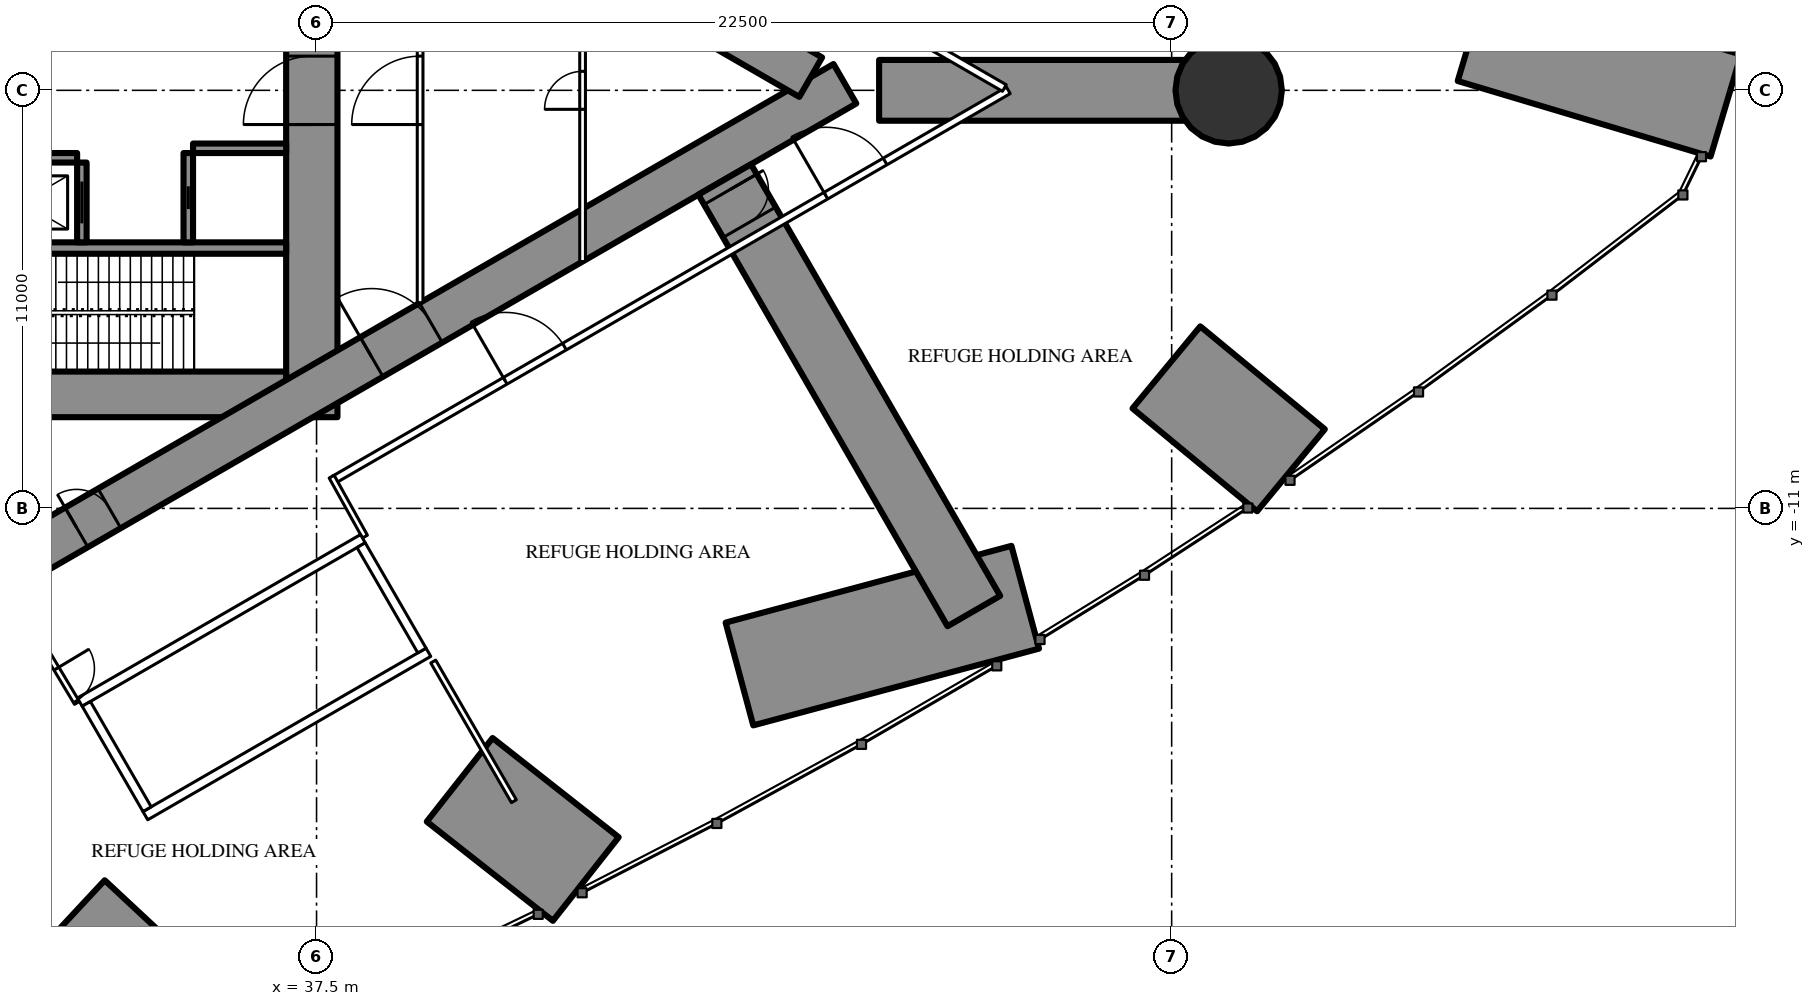
"""IFC4 building model, lengths in metres.
Left out: names, types, materials, properties, quantities, classifications, styles, units other than length and angle.
Written with IfcOpenShell. Run it as: python <this file> out.ifc"""

import sys

from ifc_helpers import new_model, si_unit, direction, frame, frame_2d, origin, origin_2d, place, context, subcontext, project, spatial, rectangle, hollow_circle, extrude, element, fill, save


model = new_model("IFC4")
c1 = context("Model", 3, precision=1e-05, world=origin(), true_north=direction((0.0, 1.0)))
c2 = subcontext(c1, "Body", "Model", "MODEL_VIEW")
j1 = project(units=[si_unit("LENGTHUNIT", "METRE"), si_unit("PLANEANGLEUNIT", "RADIAN")], contexts=[c1])
p1 = place(None, origin())
s1 = spatial("IfcSite", under=j1, at=p1, CompositionType="ELEMENT")
p2 = place(p1, origin())
s2 = spatial("IfcBuilding", under=s1, at=p2, CompositionType="ELEMENT")
p3 = place(p2, frame((0.0, 0.0, 81.0)))
s3 = spatial("IfcBuildingStorey", under=s2, at=p3, CompositionType="ELEMENT", Elevation=81.0)
p4 = place(p3, frame((74.581, -0.401, 0.0), z_axis=(0.0, 0.0, 1.0), x_axis=(-0.958128639998, 0.286338102974, 0.0)))
e1 = element("IfcWall", 1, at=p4, inside=s3, PredefinedType="SHEAR", context=c2, shape_type="SweptSolid", body=[
    extrude(rectangle(XDim=6.944, YDim=2.8, at=frame_2d((3.472, 0.0))), origin(), (0.0, 0.0, 1.0), 6.0),
])
p5 = place(p3, frame((28.957, -26.027, 0.0), z_axis=(0.0, 0.0, 1.0), x_axis=(0.681428532725, 0.731884659484, 0.0)))
e2 = element("IfcWall", 2, at=p5, inside=s3, PredefinedType="SHEAR", context=c2, shape_type="SweptSolid", body=[
    extrude(rectangle(XDim=5.86, YDim=2.8, at=frame_2d((2.93, 0.0))), origin(), (0.0, 0.0, 1.0), 6.0),
])
p6 = place(p3, frame((44.584, -20.752, 0.0), z_axis=(0.0, 0.0, 1.0), x_axis=(-0.785936955348, 0.618306640931, 0.0)))
e3 = element("IfcWall", 3, at=p6, inside=s3, PredefinedType="SHEAR", context=c2, shape_type="SweptSolid", body=[
    extrude(rectangle(XDim=4.222, YDim=2.8, at=frame_2d((2.111, 0.0))), origin(), (0.0, 0.0, 1.0), 6.0),
])
p7 = place(p3, frame((56.147, -13.337, 0.0), z_axis=(0.0, 0.0, 1.0), x_axis=(-0.965766047912, -0.259414611578, 0.0)))
e4 = element("IfcWall", 4, at=p7, inside=s3, PredefinedType="SHEAR", context=c2, shape_type="SweptSolid", body=[
    extrude(rectangle(XDim=7.787, YDim=2.8, at=frame_2d((3.894, 0.0))), origin(), (0.0, 0.0, 1.0), 6.0),
])
p8 = place(p3, frame((63.139, -9.996, 0.0), z_axis=(0.0, 0.0, 1.0), x_axis=(-0.771080676244, 0.636737458238, 0.0)))
e5 = element("IfcWall", 5, at=p8, inside=s3, PredefinedType="SHEAR", context=c2, shape_type="SweptSolid", body=[
    extrude(rectangle(XDim=4.251, YDim=2.8, at=frame_2d((2.125, 0.0))), origin(), (0.0, 0.0, 1.0), 6.0),
])
p9 = place(p3, frame((61.5, 0.0, 0.0), z_axis=(0.0, 0.0, 1.0), x_axis=(1.0, 0.0, 0.0)))
e6 = element("IfcColumn", 6, at=p9, inside=s3, PredefinedType="COLUMN", context=c2, shape_type="SweptSolid", body=[
    extrude(hollow_circle(Radius=1.4, WallThickness=0.1, at=origin_2d()), origin(), (0.0, 0.0, 1.0), 6.0),
])
p10 = place(p3, frame((37.375, -8.6, 0.0), z_axis=(0.0, 0.0, 1.0), x_axis=(0.0, 1.0, 0.0)))
e7 = element("IfcWall", 7, at=p10, inside=s3, PredefinedType="SHEAR", context=c2, shape_type="SweptSolid", body=[
    extrude(rectangle(XDim=17.2, YDim=1.35, at=frame_2d((8.6, 0.0))), origin(), (0.0, 0.0, 1.0), 6.0),
])
p11 = place(p10, frame((7.7, 0.0, 0.0)))
e8 = element("IfcOpeningElement", 8, at=p11, cuts=e7, PredefinedType="OPENING", context=c2, shape_type="SweptSolid", body=[
    extrude(rectangle(XDim=1.8, YDim=2.2, at=frame_2d((0.9, 1.1))), frame((0.0, 0.685, 0.0), z_axis=(0.0, -1.0, 0.0), x_axis=(1.0, 0.0, 0.0)), (0.0, 0.0, 1.0), 1.37),
])
p12 = place(p3, frame((28.3, -8.0, 0.0), z_axis=(0.0, 0.0, 1.0), x_axis=(1.0, 0.0, 0.0)))
e9 = element("IfcWall", 9, at=p12, inside=s3, PredefinedType="SHEAR", context=c2, shape_type="SweptSolid", body=[
    extrude(rectangle(XDim=8.4, YDim=1.2, at=frame_2d((4.2, 0.0))), origin(), (0.0, 0.0, 1.0), 6.0),
])
p13 = place(p12, frame((0.25, 0.0, 0.0)))
e10 = element("IfcOpeningElement", 10, at=p13, cuts=e9, PredefinedType="OPENING", context=c2, shape_type="SweptSolid", body=[
    extrude(rectangle(XDim=1.0, YDim=2.2, at=frame_2d((0.5, 1.1))), frame((0.0, 0.61, 0.0), z_axis=(0.0, -1.0, 0.0), x_axis=(1.0, 0.0, 0.0)), (0.0, 0.0, 1.0), 1.22),
])
p14 = place(p3, frame((28.3, -4.15, 0.0), z_axis=(0.0, 0.0, 1.0), x_axis=(1.0, 0.0, 0.0)))
e11 = element("IfcWall", 11, at=p14, inside=s3, PredefinedType="SHEAR", context=c2, shape_type="SweptSolid", body=[
    extrude(rectangle(XDim=8.4, YDim=0.3, at=frame_2d((4.2, 0.0))), origin(), (0.0, 0.0, 1.0), 6.0),
])
p15 = place(p3, frame((31.325, -4.0, 0.0), z_axis=(0.0, 0.0, 1.0), x_axis=(0.0, 1.0, 0.0)))
e12 = element("IfcWall", 12, at=p15, inside=s3, PredefinedType="SHEAR", context=c2, shape_type="SweptSolid", body=[
    extrude(rectangle(XDim=2.1, YDim=0.25, at=frame_2d((1.05, 0.0))), origin(), (0.0, 0.0, 1.0), 6.0),
])
p16 = place(p15, frame((0.5, 0.0, 0.0)))
e13 = element("IfcOpeningElement", 13, at=p16, cuts=e12, PredefinedType="OPENING", context=c2, shape_type="SweptSolid", body=[
    extrude(rectangle(XDim=1.1, YDim=2.2, at=frame_2d((0.55, 1.1))), frame((0.0, 0.135, 0.0), z_axis=(0.0, -1.0, 0.0), x_axis=(1.0, 0.0, 0.0)), (0.0, 0.0, 1.0), 0.27),
])
p17 = place(p3, frame((34.125, -4.0, 0.0), z_axis=(0.0, 0.0, 1.0), x_axis=(0.0, 1.0, 0.0)))
e14 = element("IfcWall", 14, at=p17, inside=s3, PredefinedType="SHEAR", context=c2, shape_type="SweptSolid", body=[
    extrude(rectangle(XDim=2.35, YDim=0.25, at=frame_2d((1.175, 0.0))), origin(), (0.0, 0.0, 1.0), 6.0),
])
p18 = place(p17, frame((0.875, 0.0, 0.0)))
e15 = element("IfcOpeningElement", 15, at=p18, cuts=e14, PredefinedType="OPENING", context=c2, shape_type="SweptSolid", body=[
    extrude(rectangle(XDim=0.6, YDim=2.0, at=frame_2d((0.3, 1.0))), frame((0.0, 0.135, 0.0), z_axis=(0.0, -1.0, 0.0), x_axis=(1.0, 0.0, 0.0)), (0.0, 0.0, 1.0), 0.27),
])
p19 = place(p3, frame((28.3, -1.775, 0.0), z_axis=(0.0, 0.0, 1.0), x_axis=(1.0, 0.0, 0.0)))
e16 = element("IfcWall", 16, at=p19, inside=s3, PredefinedType="SHEAR", context=c2, shape_type="SweptSolid", body=[
    extrude(rectangle(XDim=2.9, YDim=0.25, at=frame_2d((1.45, 0.0))), origin(), (0.0, 0.0, 1.0), 6.0),
])
p20 = place(p3, frame((34.25, -1.525, 0.0), z_axis=(0.0, 0.0, 1.0), x_axis=(1.0, 0.0, 0.0)))
e17 = element("IfcWall", 17, at=p20, inside=s3, PredefinedType="SHEAR", context=c2, shape_type="SweptSolid", body=[
    extrude(rectangle(XDim=2.45, YDim=0.25, at=frame_2d((1.225, 0.0))), origin(), (0.0, 0.0, 1.0), 6.0),
])
p21 = place(p3, frame((27.2, -13.8, 0.0), z_axis=(0.0, 0.0, 1.0), x_axis=(0.866027159892, 0.499996958321, 0.0)))
e18 = element("IfcWall", 18, at=p21, inside=s3, PredefinedType="SHEAR", context=c2, shape_type="SweptSolid", body=[
    extrude(rectangle(XDim=27.947, YDim=1.2, at=frame_2d((13.973, 0.0))), origin(), (0.0, 0.0, 1.0), 6.0),
])
p22 = place(p21, frame((4.6, 0.0, 0.0)))
e19 = element("IfcOpeningElement", 19, at=p22, cuts=e18, PredefinedType="OPENING", context=c2, shape_type="SweptSolid", body=[
    extrude(rectangle(XDim=1.0, YDim=2.2, at=frame_2d((0.5, 1.1))), frame((0.0, 0.61, 0.0), z_axis=(0.0, -1.0, 0.0), x_axis=(1.0, 0.0, 0.0)), (0.0, 0.0, 1.0), 1.22),
])
p23 = place(p21, frame((13.568, 0.0, 0.0)))
e20 = element("IfcOpeningElement", 20, at=p23, cuts=e18, PredefinedType="OPENING", context=c2, shape_type="SweptSolid", body=[
    extrude(rectangle(XDim=1.8, YDim=2.2, at=frame_2d((0.9, 1.1))), frame((0.0, 0.61, 0.0), z_axis=(0.0, -1.0, 0.0), x_axis=(1.0, 0.0, 0.0)), (0.0, 0.0, 1.0), 1.22),
])
p24 = place(p3, frame((27.2, 13.8, 0.0), z_axis=(0.0, 0.0, 1.0), x_axis=(0.866024515034, -0.500001539357, 0.0)))
e21 = element("IfcWall", 21, at=p24, inside=s3, PredefinedType="SHEAR", context=c2, shape_type="SweptSolid", body=[
    extrude(rectangle(XDim=26.907, YDim=1.2, at=frame_2d((13.454, 0.0))), origin(), (0.0, 0.0, 1.0), 6.0),
])
p25 = place(p24, frame((4.6, 0.0, 0.0)))
e22 = element("IfcOpeningElement", 22, at=p25, cuts=e21, PredefinedType="OPENING", context=c2, shape_type="SweptSolid", body=[
    extrude(rectangle(XDim=1.0, YDim=2.2, at=frame_2d((0.5, 1.1))), frame((0.0, 0.61, 0.0), z_axis=(0.0, -1.0, 0.0), x_axis=(1.0, 0.0, 0.0)), (0.0, 0.0, 1.0), 1.22),
])
p26 = place(p24, frame((13.568, 0.0, 0.0)))
e23 = element("IfcOpeningElement", 23, at=p26, cuts=e21, PredefinedType="OPENING", context=c2, shape_type="SweptSolid", body=[
    extrude(rectangle(XDim=1.8, YDim=2.2, at=frame_2d((0.9, 1.1))), frame((0.0, 0.61, 0.0), z_axis=(0.0, -1.0, 0.0), x_axis=(1.0, 0.0, 0.0)), (0.0, 0.0, 1.0), 1.22),
])
p27 = place(p3, frame((48.239, -2.346, 0.0), z_axis=(0.0, 0.0, 1.0), x_axis=(0.500006130383, -0.866021864377, 0.0)))
e24 = element("IfcWall", 24, at=p27, inside=s3, PredefinedType="SHEAR", context=c2, shape_type="SweptSolid", body=[
    extrude(rectangle(XDim=13.112, YDim=1.6, at=frame_2d((6.556, 0.0))), origin(), (0.0, 0.0, 1.0), 6.0),
])
p28 = place(p27, frame((0.3, 0.0, 0.0)))
e25 = element("IfcOpeningElement", 25, at=p28, cuts=e24, PredefinedType="OPENING", context=c2, shape_type="SweptSolid", body=[
    extrude(rectangle(XDim=1.0, YDim=2.2, at=frame_2d((0.5, 1.1))), frame((0.0, 0.81, 0.0), z_axis=(0.0, -1.0, 0.0), x_axis=(1.0, 0.0, 0.0)), (0.0, 0.0, 1.0), 1.62),
])
p29 = place(p3, frame((52.302, 0.0, 0.0), z_axis=(0.0, 0.0, 1.0), x_axis=(1.0, 0.0, 0.0)))
e26 = element("IfcWall", 26, at=p29, inside=s3, PredefinedType="SHEAR", context=c2, shape_type="SweptSolid", body=[
    extrude(rectangle(XDim=9.198, YDim=1.6, at=frame_2d((4.599, 0.0))), origin(), (0.0, 0.0, 1.0), 6.0),
])
p30 = place(p3, frame((40.57, -15.03, 0.0), z_axis=(0.0, 0.0, 1.0), x_axis=(0.500012993597, -0.866017901798, 0.0)))
e27 = element("IfcWall", 27, at=p30, inside=s3, PredefinedType="PARTITIONING", context=c2, shape_type="SweptSolid", body=[
    extrude(rectangle(XDim=4.243, YDim=0.15, at=frame_2d((2.122, 0.0))), origin(), (0.0, 0.0, 1.0), 5.75),
])
p31 = place(p3, frame((37.96, -10.243, 0.0), z_axis=(0.0, 0.0, 1.0), x_axis=(0.866026429433, 0.499998223521, 0.0)))
e28 = element("IfcWall", 28, at=p31, inside=s3, PredefinedType="PARTITIONING", context=c2, shape_type="SweptSolid", body=[
    extrude(rectangle(XDim=20.487, YDim=0.2, at=frame_2d((10.243, 0.0))), origin(), (0.0, 0.0, 1.0), 5.75),
])
p32 = place(p31, frame((14.943, 0.0, 0.0)))
e29 = element("IfcOpeningElement", 29, at=p32, cuts=e28, PredefinedType="OPENING", context=c2, shape_type="SweptSolid", body=[
    extrude(rectangle(XDim=1.8, YDim=2.2, at=frame_2d((0.9, 1.1))), frame((0.0, 0.11, 0.0), z_axis=(0.0, -1.0, 0.0), x_axis=(1.0, 0.0, 0.0)), (0.0, 0.0, 1.0), 0.22),
])
p33 = place(p31, frame((5.2, 0.0, 0.0)))
e30 = element("IfcOpeningElement", 30, at=p33, cuts=e28, PredefinedType="OPENING", context=c2, shape_type="SweptSolid", body=[
    extrude(rectangle(XDim=1.8, YDim=2.2, at=frame_2d((0.9, 1.1))), frame((0.0, 0.11, 0.0), z_axis=(0.0, -1.0, 0.0), x_axis=(1.0, 0.0, 0.0)), (0.0, 0.0, 1.0), 0.22),
])
p34 = place(p3, frame((36.834, 10.894, 0.0), z_axis=(0.0, 0.0, 1.0), x_axis=(0.866028157229, -0.499995230863, 0.0)))
e31 = element("IfcWall", 31, at=p34, inside=s3, PredefinedType="PARTITIONING", context=c2, shape_type="SweptSolid", body=[
    extrude(rectangle(XDim=21.667, YDim=0.2, at=frame_2d((10.833, 0.0))), origin(), (0.0, 0.0, 1.0), 5.75),
])
p35 = place(p34, frame((14.594, 0.0, 0.0)))
e32 = element("IfcOpeningElement", 32, at=p35, cuts=e31, PredefinedType="OPENING", context=c2, shape_type="SweptSolid", body=[
    extrude(rectangle(XDim=1.8, YDim=2.2, at=frame_2d((0.9, 1.1))), frame((0.0, 0.11, 0.0), z_axis=(0.0, -1.0, 0.0), x_axis=(1.0, 0.0, 0.0)), (0.0, 0.0, 1.0), 0.22),
])
p36 = place(p34, frame((4.073, 0.0, 0.0)))
e33 = element("IfcOpeningElement", 33, at=p36, cuts=e31, PredefinedType="OPENING", context=c2, shape_type="SweptSolid", body=[
    extrude(rectangle(XDim=2.0, YDim=2.4, at=frame_2d((1.0, 1.2))), frame((0.0, 0.11, 0.0), z_axis=(0.0, -1.0, 0.0), x_axis=(1.0, 0.0, 0.0)), (0.0, 0.0, 1.0), 0.22),
])
p37 = place(p3, frame((30.267, -14.569, 0.0), z_axis=(0.0, 0.0, 1.0), x_axis=(0.514336634837, -0.857588377991, 0.0)))
e34 = element("IfcWall", 34, at=p37, inside=s3, PredefinedType="PARTITIONING", context=c2, shape_type="SweptSolid", body=[
    extrude(rectangle(XDim=1.805, YDim=0.15, at=frame_2d((0.903, 0.0))), origin(), (0.0, 0.0, 1.0), 2.75),
])
p38 = place(p37, frame((0.755, 0.0, 0.0)))
e35 = element("IfcOpeningElement", 35, at=p38, cuts=e34, PredefinedType="OPENING", context=c2, shape_type="SweptSolid", body=[
    extrude(rectangle(XDim=1.0, YDim=2.2, at=frame_2d((0.5, 1.1))), frame((0.0, 0.085, 0.0), z_axis=(0.0, -1.0, 0.0), x_axis=(1.0, 0.0, 0.0)), (0.0, 0.0, 1.0), 0.17),
])
p39 = place(p3, frame((38.773, -11.742, 0.0), z_axis=(0.0, 0.0, 1.0), x_axis=(-0.485528096672, 0.8742210632, 0.0)))
e36 = element("IfcWall", 36, at=p39, inside=s3, PredefinedType="PARTITIONING", context=c2, shape_type="SweptSolid", body=[
    extrude(rectangle(XDim=1.805, YDim=0.15, at=frame_2d((0.903, 0.0))), origin(), (0.0, 0.0, 1.0), 5.75),
])
p40 = place(p3, frame((40.225, -5.587, 0.0), z_axis=(0.0, 0.0, 1.0), x_axis=(0.0, 1.0, 0.0)))
e37 = element("IfcWall", 37, at=p40, inside=s3, PredefinedType="PARTITIONING", context=c2, shape_type="SweptSolid", body=[
    extrude(rectangle(XDim=11.174, YDim=0.15, at=frame_2d((5.587, 0.0))), origin(), (0.0, 0.0, 1.0), 5.75),
])
p41 = place(p40, frame((4.687, 0.0, 0.0)))
e38 = element("IfcOpeningElement", 38, at=p41, cuts=e37, PredefinedType="OPENING", context=c2, shape_type="SweptSolid", body=[
    extrude(rectangle(XDim=1.8, YDim=2.2, at=frame_2d((0.9, 1.1))), frame((0.0, 0.085, 0.0), z_axis=(0.0, -1.0, 0.0), x_axis=(1.0, 0.0, 0.0)), (0.0, 0.0, 1.0), 0.17),
])
p42 = place(p3, frame((44.5, -4.505, 0.0), z_axis=(0.0, 0.0, 1.0), x_axis=(0.0, 1.0, 0.0)))
e39 = element("IfcWall", 39, at=p42, inside=s3, PredefinedType="PARTITIONING", context=c2, shape_type="SweptSolid", body=[
    extrude(rectangle(XDim=9.009, YDim=0.15, at=frame_2d((4.505, 0.0))), origin(), (0.0, 0.0, 1.0), 5.75),
])
p43 = place(p42, frame((4.005, 0.0, 0.0)))
e40 = element("IfcOpeningElement", 40, at=p43, cuts=e39, PredefinedType="OPENING", context=c2, shape_type="SweptSolid", body=[
    extrude(rectangle(XDim=1.0, YDim=2.2, at=frame_2d((0.5, 1.1))), frame((0.0, 0.085, 0.0), z_axis=(0.0, -1.0, 0.0), x_axis=(1.0, 0.0, 0.0)), (0.0, 0.0, 1.0), 0.17),
])
for number, where, z_axis, x_axis in (
    (41, (31.271, -16.097, 0.0), (0.0, 0.0, 1.0), (0.866, 0.5, 0.0)),
    (42, (32.996, -19.086, 0.0), (0.0, 0.0, 1.0), (0.866, 0.5, 0.0)),
):
    element("IfcWall", number, at=place(p3, frame(where, z_axis=z_axis, x_axis=x_axis)), inside=s3, PredefinedType="PARTITIONING", context=c2, shape_type="SweptSolid", body=[
        extrude(rectangle(XDim=8.6, YDim=0.25, at=frame_2d((4.3, 0.0))), origin(), (0.0, 0.0, 1.0), 5.75),
    ])
for number, where, z_axis, x_axis in (
    (43, (31.441, -16.143, 0.0), (0.0, 0.0, 1.0), (0.5, -0.866, 0.0)),
    (44, (38.673, -11.968, 0.0), (0.0, 0.0, 1.0), (0.5, -0.866, 0.0)),
):
    element("IfcWall", number, at=place(p3, frame(where, z_axis=z_axis, x_axis=x_axis)), inside=s3, PredefinedType="PARTITIONING", context=c2, shape_type="SweptSolid", body=[
        extrude(rectangle(XDim=3.201, YDim=0.25, at=frame_2d((1.6, 0.0))), origin(), (0.0, 0.0, 1.0), 5.75),
    ])
p44 = place(p28, origin())
e45 = element("IfcDoor", 45, at=p44, inside=s3, OperationType="SINGLE_SWING_LEFT", PredefinedType="DOOR", context=c2, shape_type="SweptSolid", body=[
    extrude(rectangle(XDim=1.0, YDim=2.2, at=frame_2d((0.5, 1.1))), frame((0.0, 0.025, 0.0), z_axis=(0.0, -1.0, 0.0), x_axis=(1.0, 0.0, 0.0)), (0.0, 0.0, 1.0), 0.05),
])
fill(e25, e45)
p45 = place(p32, origin())
e46 = element("IfcDoor", 46, at=p45, inside=s3, OperationType="DOUBLE_DOOR_SINGLE_SWING", PredefinedType="DOOR", context=c2, shape_type="SweptSolid", body=[
    extrude(rectangle(XDim=1.8, YDim=2.2, at=frame_2d((0.9, 1.1))), frame((0.0, 0.025, 0.0), z_axis=(0.0, -1.0, 0.0), x_axis=(1.0, 0.0, 0.0)), (0.0, 0.0, 1.0), 0.05),
])
fill(e29, e46)
p46 = place(p38, origin())
e47 = element("IfcDoor", 47, at=p46, inside=s3, OperationType="SINGLE_SWING_LEFT", PredefinedType="DOOR", context=c2, shape_type="SweptSolid", body=[
    extrude(rectangle(XDim=1.0, YDim=2.2, at=frame_2d((0.5, 1.1))), frame((0.0, 0.025, 0.0), z_axis=(0.0, -1.0, 0.0), x_axis=(1.0, 0.0, 0.0)), (0.0, 0.0, 1.0), 0.05),
])
fill(e35, e47)
p47 = place(p33, origin())
e48 = element("IfcDoor", 48, at=p47, inside=s3, OperationType="DOUBLE_DOOR_SINGLE_SWING", PredefinedType="DOOR", context=c2, shape_type="SweptSolid", body=[
    extrude(rectangle(XDim=1.8, YDim=2.2, at=frame_2d((0.9, 1.1))), frame((0.0, 0.025, 0.0), z_axis=(0.0, -1.0, 0.0), x_axis=(1.0, 0.0, 0.0)), (0.0, 0.0, 1.0), 0.05),
])
fill(e30, e48)
p48 = place(p41, origin())
e49 = element("IfcDoor", 49, at=p48, inside=s3, OperationType="DOUBLE_DOOR_SINGLE_SWING", PredefinedType="DOOR", context=c2, shape_type="SweptSolid", body=[
    extrude(rectangle(XDim=1.8, YDim=2.2, at=frame_2d((0.9, 1.1))), frame((0.0, 0.025, 0.0), z_axis=(0.0, -1.0, 0.0), x_axis=(1.0, 0.0, 0.0)), (0.0, 0.0, 1.0), 0.05),
])
fill(e38, e49)
p49 = place(p43, origin())
e50 = element("IfcDoor", 50, at=p49, inside=s3, OperationType="SINGLE_SWING_LEFT", PredefinedType="DOOR", context=c2, shape_type="SweptSolid", body=[
    extrude(rectangle(XDim=1.0, YDim=2.2, at=frame_2d((0.5, 1.1))), frame((0.0, 0.025, 0.0), z_axis=(0.0, -1.0, 0.0), x_axis=(1.0, 0.0, 0.0)), (0.0, 0.0, 1.0), 0.05),
])
fill(e40, e50)
p50 = place(p22, origin())
e51 = element("IfcDoor", 51, at=p50, inside=s3, OperationType="SINGLE_SWING_LEFT", PredefinedType="DOOR", context=c2, shape_type="SweptSolid", body=[
    extrude(rectangle(XDim=1.0, YDim=2.2, at=frame_2d((0.5, 1.1))), frame((0.0, 0.025, 0.0), z_axis=(0.0, -1.0, 0.0), x_axis=(1.0, 0.0, 0.0)), (0.0, 0.0, 1.0), 0.05),
])
fill(e19, e51)
p51 = place(p23, origin())
e52 = element("IfcDoor", 52, at=p51, inside=s3, OperationType="DOUBLE_DOOR_SINGLE_SWING", PredefinedType="DOOR", context=c2, shape_type="SweptSolid", body=[
    extrude(rectangle(XDim=1.8, YDim=2.2, at=frame_2d((0.9, 1.1))), frame((0.0, 0.025, 0.0), z_axis=(0.0, -1.0, 0.0), x_axis=(1.0, 0.0, 0.0)), (0.0, 0.0, 1.0), 0.05),
])
fill(e20, e52)
p52 = place(p11, origin())
e53 = element("IfcDoor", 53, at=p52, inside=s3, OperationType="DOUBLE_DOOR_SINGLE_SWING", PredefinedType="DOOR", context=c2, shape_type="SweptSolid", body=[
    extrude(rectangle(XDim=1.8, YDim=2.2, at=frame_2d((0.9, 1.1))), frame((0.0, 0.025, 0.0), z_axis=(0.0, -1.0, 0.0), x_axis=(1.0, 0.0, 0.0)), (0.0, 0.0, 1.0), 0.05),
])
fill(e8, e53)
p53 = place(p16, origin())
e54 = element("IfcDoor", 54, at=p53, inside=s3, OperationType="SLIDING_TO_LEFT", PredefinedType="USERDEFINED", context=c2, shape_type="SweptSolid", body=[
    extrude(rectangle(XDim=1.1, YDim=2.2, at=frame_2d((0.55, 1.1))), frame((0.0, 0.025, 0.0), z_axis=(0.0, -1.0, 0.0), x_axis=(1.0, 0.0, 0.0)), (0.0, 0.0, 1.0), 0.05),
])
fill(e13, e54)
p54 = place(p18, origin())
e55 = element("IfcDoor", 55, at=p54, inside=s3, OperationType="SLIDING_TO_LEFT", PredefinedType="DOOR", context=c2, shape_type="SweptSolid", body=[
    extrude(rectangle(XDim=0.6, YDim=2.0, at=frame_2d((0.3, 1.0))), frame((0.0, 0.025, 0.0), z_axis=(0.0, -1.0, 0.0), x_axis=(1.0, 0.0, 0.0)), (0.0, 0.0, 1.0), 0.05),
])
fill(e15, e55)
save(model, sys.argv[1])
